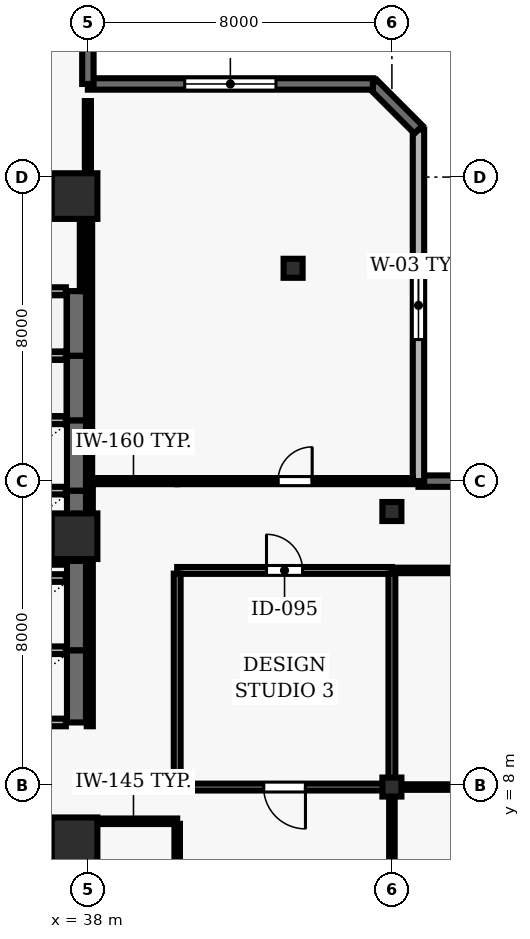
"""IFC4 building model, lengths in metres.
Left out: names, types, materials, properties, quantities, classifications, styles, units other than length and angle.
Written with IfcOpenShell. Run it as: python <this file> out.ifc"""

import sys

from ifc_helpers import new_model, si_unit, direction, frame, frame_2d, origin, origin_2d, place, context, subcontext, project, spatial, rectangle, hollow_rectangle, extrude, element, fill, save


model = new_model("IFC4")
c1 = context("Model", 3, precision=1e-05, world=origin(), true_north=direction((0.0, 1.0)))
c2 = subcontext(c1, "Body", "Model", "MODEL_VIEW")
j1 = project(units=[si_unit("LENGTHUNIT", "METRE"), si_unit("PLANEANGLEUNIT", "RADIAN")], contexts=[c1])
p1 = place(None, origin())
s1 = spatial("IfcSite", under=j1, at=p1, CompositionType="ELEMENT")
p2 = place(p1, origin())
s2 = spatial("IfcBuilding", under=s1, at=p2, CompositionType="ELEMENT")
p3 = place(p2, frame((0.0, 0.0, 138.5)))
s3 = spatial("IfcBuildingStorey", under=s2, at=p3, CompositionType="ELEMENT", Elevation=138.5)
for number, where, z_axis, x_axis in (
    (1, (37.65, 6.55, 0.0), (0.0, 0.0, 1.0), (1.0, 0.0, 0.0)),
    (2, (37.65, 14.55, 0.0), (0.0, 0.0, 1.0), (1.0, 0.0, 0.0)),
    (3, (37.65, 23.5, 0.0), (0.0, 0.0, 1.0), (1.0, 0.0, 0.0)),
):
    element("IfcColumn", number, at=place(p3, frame(where, z_axis=z_axis, x_axis=x_axis)), inside=s3, PredefinedType="COLUMN", context=c2, shape_type="SweptSolid", body=[
        extrude(rectangle(XDim=1.2, YDim=1.2, at=origin_2d()), origin(), (0.0, 0.0, 1.0), 3.9),
    ])
for number, where, z_axis, x_axis in (
    (4, (46.0, 7.95, 0.0), (0.0, 0.0, 1.0), (1.0, 0.0, 0.0)),
    (5, (46.0, 15.2, 0.0), (0.0, 0.0, 1.0), (1.0, 0.0, 0.0)),
    (6, (43.4, 21.6, 0.0), (0.0, 0.0, 1.0), (1.0, 0.0, 0.0)),
):
    element("IfcColumn", number, at=place(p3, frame(where, z_axis=z_axis, x_axis=x_axis)), inside=s3, PredefinedType="COLUMN", context=c2, shape_type="SweptSolid", body=[
        extrude(hollow_rectangle(XDim=0.5, YDim=0.5, WallThickness=0.025, at=origin_2d()), origin(), (0.0, 0.0, 1.0), 3.9),
    ])
p4 = place(p3, frame((68.1, 16.0, 0.0), z_axis=(0.0, 0.0, 1.0), x_axis=(-1.0, 0.0, 0.0)))
e7 = element("IfcWall", 7, at=p4, inside=s3, PredefinedType="SOLIDWALL", context=c2, shape_type="SweptSolid", body=[
    extrude(rectangle(XDim=21.401, YDim=0.3, at=frame_2d((10.701, 0.0))), origin(), (0.0, 0.0, 1.0), 3.69),
])
p5 = place(p4, frame((12.3, 0.0, 0.0)))
e8 = element("IfcOpeningElement", 8, at=p5, cuts=e7, PredefinedType="OPENING", context=c2, shape_type="SweptSolid", body=[
    extrude(rectangle(XDim=1.0, YDim=2.2, at=frame_2d((0.5, 1.1))), frame((0.0, 0.16, 0.0), z_axis=(0.0, -1.0, 0.0), x_axis=(1.0, 0.0, 0.0)), (0.0, 0.0, 1.0), 0.32),
])
p6 = place(p4, frame((2.817, 0.0, 0.9)))
e9 = element("IfcOpeningElement", 9, at=p6, cuts=e7, PredefinedType="OPENING", context=c2, shape_type="SweptSolid", body=[
    extrude(rectangle(XDim=1.5, YDim=1.6, at=frame_2d((0.75, 0.8))), frame((0.0, 0.16, 0.0), z_axis=(0.0, -1.0, 0.0), x_axis=(1.0, 0.0, 0.0)), (0.0, 0.0, 1.0), 0.32),
])
p7 = place(p4, frame((9.95, 0.0, 0.9)))
e10 = element("IfcOpeningElement", 10, at=p7, cuts=e7, PredefinedType="OPENING", context=c2, shape_type="SweptSolid", body=[
    extrude(rectangle(XDim=1.5, YDim=1.6, at=frame_2d((0.75, 0.8))), frame((0.0, 0.16, 0.0), z_axis=(0.0, -1.0, 0.0), x_axis=(1.0, 0.0, 0.0)), (0.0, 0.0, 1.0), 0.32),
])
p8 = place(p4, frame((17.084, 0.0, 0.9)))
e11 = element("IfcOpeningElement", 11, at=p8, cuts=e7, PredefinedType="OPENING", context=c2, shape_type="SweptSolid", body=[
    extrude(rectangle(XDim=1.5, YDim=1.6, at=frame_2d((0.75, 0.8))), frame((0.0, 0.16, 0.0), z_axis=(0.0, -1.0, 0.0), x_axis=(1.0, 0.0, 0.0)), (0.0, 0.0, 1.0), 0.32),
])
p9 = place(p3, frame((46.699, 16.0, 0.0), z_axis=(0.0, 0.0, 1.0), x_axis=(0.0, 1.0, 0.0)))
e12 = element("IfcWall", 12, at=p9, inside=s3, PredefinedType="SOLIDWALL", context=c2, shape_type="SweptSolid", body=[
    extrude(rectangle(XDim=9.25, YDim=0.3, at=frame_2d((4.625, 0.0))), origin(), (0.0, 0.0, 1.0), 3.69),
])
p10 = place(p9, frame((3.725, 0.0, 0.9)))
e13 = element("IfcOpeningElement", 13, at=p10, cuts=e12, PredefinedType="OPENING", context=c2, shape_type="SweptSolid", body=[
    extrude(rectangle(XDim=1.8, YDim=1.6, at=frame_2d((0.9, 0.8))), frame((0.0, 0.16, 0.0), z_axis=(0.0, -1.0, 0.0), x_axis=(1.0, 0.0, 0.0)), (0.0, 0.0, 1.0), 0.32),
])
p11 = place(p3, frame((46.699, 25.25, 0.0), z_axis=(0.0, 0.0, 1.0), x_axis=(-0.707106781187, 0.707106781187, 0.0)))
e14 = element("IfcWall", 14, at=p11, inside=s3, PredefinedType="SOLIDWALL", context=c2, shape_type="SweptSolid", body=[
    extrude(rectangle(XDim=1.697, YDim=0.3, at=frame_2d((0.849, 0.0))), origin(), (0.0, 0.0, 1.0), 3.69),
])
p12 = place(p3, frame((45.499, 26.45, 0.0), z_axis=(0.0, 0.0, 1.0), x_axis=(-1.0, 0.0, 0.0)))
e15 = element("IfcWall", 15, at=p12, inside=s3, PredefinedType="SOLIDWALL", context=c2, shape_type="SweptSolid", body=[
    extrude(rectangle(XDim=7.499, YDim=0.3, at=frame_2d((3.75, 0.0))), origin(), (0.0, 0.0, 1.0), 3.69),
])
p13 = place(p12, frame((2.55, 0.0, 0.9)))
e16 = element("IfcOpeningElement", 16, at=p13, cuts=e15, PredefinedType="OPENING", context=c2, shape_type="SweptSolid", body=[
    extrude(rectangle(XDim=2.4, YDim=1.6, at=frame_2d((1.2, 0.8))), frame((0.0, 0.16, 0.0), z_axis=(0.0, -1.0, 0.0), x_axis=(1.0, 0.0, 0.0)), (0.0, 0.0, 1.0), 0.32),
])
p14 = place(p3, frame((38.0, 26.45, 0.0), z_axis=(0.0, 0.0, 1.0), x_axis=(0.0, 1.0, 0.0)))
e17 = element("IfcWall", 17, at=p14, inside=s3, PredefinedType="SOLIDWALL", context=c2, shape_type="SweptSolid", body=[
    extrude(rectangle(XDim=19.65, YDim=0.3, at=frame_2d((9.825, 0.0))), origin(), (0.0, 0.0, 1.0), 3.69),
])
p15 = place(p14, frame((11.625, 0.0, 0.0)))
e18 = element("IfcOpeningElement", 18, at=p15, cuts=e17, PredefinedType="OPENING", context=c2, shape_type="SweptSolid", body=[
    extrude(rectangle(XDim=1.0, YDim=2.2, at=frame_2d((0.5, 1.1))), frame((0.0, 0.16, 0.0), z_axis=(0.0, -1.0, 0.0), x_axis=(1.0, 0.0, 0.0)), (0.0, 0.0, 1.0), 0.32),
])
p16 = place(p14, frame((15.625, 0.0, 0.9)))
e19 = element("IfcOpeningElement", 19, at=p16, cuts=e17, PredefinedType="OPENING", context=c2, shape_type="SweptSolid", body=[
    extrude(rectangle(XDim=1.5, YDim=1.8, at=frame_2d((0.75, 0.9))), frame((0.0, 0.16, 0.0), z_axis=(0.0, -1.0, 0.0), x_axis=(1.0, 0.0, 0.0)), (0.0, 0.0, 1.0), 0.32),
])
p17 = place(p3, frame((37.7, 4.7, 0.0), z_axis=(0.0, 0.0, 1.0), x_axis=(0.0, 1.0, 0.0)))
e20 = element("IfcWall", 20, at=p17, inside=s3, PredefinedType="SHEAR", context=c2, shape_type="SweptSolid", body=[
    extrude(rectangle(XDim=2.25, YDim=0.5, at=frame_2d((1.125, 0.0))), origin(), (0.0, 0.0, 1.0), 3.69),
])
p18 = place(p3, frame((37.42, 6.95, 0.0), z_axis=(0.0, 0.0, 1.0), x_axis=(-1.0, 0.0, 0.0)))
e21 = element("IfcWall", 21, at=p18, inside=s3, PredefinedType="SOLIDWALL", context=c2, shape_type="SweptSolid", body=[
    extrude(rectangle(XDim=2.14, YDim=0.2, at=frame_2d((1.07, 0.0))), origin(), (0.0, 0.0, 1.0), 3.69),
])
p19 = place(p3, frame((37.7, 9.65, 0.0), z_axis=(0.0, 0.0, 1.0), x_axis=(0.0, 1.0, 0.0)))
e22 = element("IfcWall", 22, at=p19, inside=s3, PredefinedType="SHEAR", context=c2, shape_type="SweptSolid", body=[
    extrude(rectangle(XDim=1.9, YDim=0.5, at=frame_2d((0.95, 0.0))), origin(), (0.0, 0.0, 1.0), 3.69),
])
for number, where, z_axis, x_axis in (
    (23, (35.28, 9.65, 0.0), (0.0, 0.0, 1.0), (1.0, 0.0, 0.0)),
    (24, (37.42, 11.55, 0.0), (0.0, 0.0, 1.0), (-1.0, 0.0, 0.0)),
):
    element("IfcWall", number, at=place(p3, frame(where, z_axis=z_axis, x_axis=x_axis)), inside=s3, PredefinedType="SOLIDWALL", context=c2, shape_type="SweptSolid", body=[
        extrude(rectangle(XDim=2.14, YDim=0.2, at=frame_2d((1.07, 0.0))), origin(), (0.0, 0.0, 1.0), 3.69),
    ])
p20 = place(p3, frame((37.7, 11.55, 0.0), z_axis=(0.0, 0.0, 1.0), x_axis=(0.0, 1.0, 0.0)))
e25 = element("IfcWall", 25, at=p20, inside=s3, PredefinedType="SHEAR", context=c2, shape_type="SweptSolid", body=[
    extrude(rectangle(XDim=2.35, YDim=0.5, at=frame_2d((1.175, 0.0))), origin(), (0.0, 0.0, 1.0), 3.69),
])
p21 = place(p3, frame((37.42, 13.45, 0.0), z_axis=(0.0, 0.0, 1.0), x_axis=(-1.0, 0.0, 0.0)))
e26 = element("IfcWall", 26, at=p21, inside=s3, PredefinedType="SOLIDWALL", context=c2, shape_type="SweptSolid", body=[
    extrude(rectangle(XDim=2.14, YDim=0.2, at=frame_2d((1.07, 0.0))), origin(), (0.0, 0.0, 1.0), 3.69),
])
p22 = place(p3, frame((37.7, 13.9, 0.0), z_axis=(0.0, 0.0, 1.0), x_axis=(0.0, 1.0, 0.0)))
e27 = element("IfcWall", 27, at=p22, inside=s3, PredefinedType="SHEAR", context=c2, shape_type="SweptSolid", body=[
    extrude(rectangle(XDim=1.85, YDim=0.5, at=frame_2d((0.925, 0.0))), origin(), (0.0, 0.0, 1.0), 3.69),
])
for number, where, z_axis, x_axis in (
    (28, (35.28, 13.9, 0.0), (0.0, 0.0, 1.0), (1.0, 0.0, 0.0)),
    (29, (37.42, 15.75, 0.0), (0.0, 0.0, 1.0), (-1.0, 0.0, 0.0)),
):
    element("IfcWall", number, at=place(p3, frame(where, z_axis=z_axis, x_axis=x_axis)), inside=s3, PredefinedType="SOLIDWALL", context=c2, shape_type="SweptSolid", body=[
        extrude(rectangle(XDim=2.14, YDim=0.2, at=frame_2d((1.07, 0.0))), origin(), (0.0, 0.0, 1.0), 3.69),
    ])
p23 = place(p3, frame((37.7, 15.75, 0.0), z_axis=(0.0, 0.0, 1.0), x_axis=(0.0, 1.0, 0.0)))
e30 = element("IfcWall", 30, at=p23, inside=s3, PredefinedType="SHEAR", context=c2, shape_type="SweptSolid", body=[
    extrude(rectangle(XDim=1.85, YDim=0.5, at=frame_2d((0.925, 0.0))), origin(), (0.0, 0.0, 1.0), 3.69),
])
p24 = place(p3, frame((37.42, 17.6, 0.0), z_axis=(0.0, 0.0, 1.0), x_axis=(-1.0, 0.0, 0.0)))
e31 = element("IfcWall", 31, at=p24, inside=s3, PredefinedType="SOLIDWALL", context=c2, shape_type="SweptSolid", body=[
    extrude(rectangle(XDim=2.14, YDim=0.2, at=frame_2d((1.07, 0.0))), origin(), (0.0, 0.0, 1.0), 3.69),
])
p25 = place(p3, frame((37.7, 17.6, 0.0), z_axis=(0.0, 0.0, 1.0), x_axis=(0.0, 1.0, 0.0)))
e32 = element("IfcWall", 32, at=p25, inside=s3, PredefinedType="SHEAR", context=c2, shape_type="SweptSolid", body=[
    extrude(rectangle(XDim=1.7, YDim=0.5, at=frame_2d((0.85, 0.0))), origin(), (0.0, 0.0, 1.0), 3.69),
])
p26 = place(p3, frame((37.42, 19.3, 0.0), z_axis=(0.0, 0.0, 1.0), x_axis=(-1.0, 0.0, 0.0)))
e33 = element("IfcWall", 33, at=p26, inside=s3, PredefinedType="SOLIDWALL", context=c2, shape_type="SweptSolid", body=[
    extrude(rectangle(XDim=2.14, YDim=0.2, at=frame_2d((1.07, 0.0))), origin(), (0.0, 0.0, 1.0), 3.69),
])
p27 = place(p3, frame((37.7, 19.3, 0.0), z_axis=(0.0, 0.0, 1.0), x_axis=(0.0, 1.0, 0.0)))
e34 = element("IfcWall", 34, at=p27, inside=s3, PredefinedType="SHEAR", context=c2, shape_type="SweptSolid", body=[
    extrude(rectangle(XDim=1.7, YDim=0.5, at=frame_2d((0.85, 0.0))), origin(), (0.0, 0.0, 1.0), 3.69),
])
p28 = place(p3, frame((37.42, 21.0, 0.0), z_axis=(0.0, 0.0, 1.0), x_axis=(-1.0, 0.0, 0.0)))
e35 = element("IfcWall", 35, at=p28, inside=s3, PredefinedType="SOLIDWALL", context=c2, shape_type="SweptSolid", body=[
    extrude(rectangle(XDim=2.14, YDim=0.2, at=frame_2d((1.07, 0.0))), origin(), (0.0, 0.0, 1.0), 3.69),
])
p29 = place(p3, frame((37.85, 23.85, 0.0), z_axis=(0.0, 0.0, 1.0), x_axis=(-1.0, 0.0, 0.0)))
e36 = element("IfcWall", 36, at=p29, inside=s3, PredefinedType="PARTITIONING", context=c2, shape_type="SweptSolid", body=[
    extrude(rectangle(XDim=2.0, YDim=0.16, at=frame_2d((1.0, 0.0))), origin(), (0.0, 0.0, 1.0), 3.073),
])
p30 = place(p3, frame((38.05, 7.05, 0.0), z_axis=(0.0, 0.0, 1.0), x_axis=(1.0, 0.0, 0.0)))
e37 = element("IfcWall", 37, at=p30, inside=s3, PredefinedType="PARTITIONING", context=c2, shape_type="SweptSolid", body=[
    extrude(rectangle(XDim=2.3, YDim=0.145, at=frame_2d((1.15, 0.0))), origin(), (0.0, 0.0, 1.0), 3.69),
])
p31 = place(p3, frame((40.35, 13.65, 0.0), z_axis=(0.0, 0.0, 1.0), x_axis=(1.0, 0.0, 0.0)))
e38 = element("IfcWall", 38, at=p31, inside=s3, PredefinedType="PARTITIONING", context=c2, shape_type="SweptSolid", body=[
    extrude(rectangle(XDim=5.65, YDim=0.18, at=frame_2d((2.825, 0.0))), origin(), (0.0, 0.0, 1.0), 3.69),
])
p32 = place(p31, frame((2.35, 0.0, 0.0)))
e39 = element("IfcOpeningElement", 39, at=p32, cuts=e38, PredefinedType="OPENING", context=c2, shape_type="SweptSolid", body=[
    extrude(rectangle(XDim=0.95, YDim=2.1, at=frame_2d((0.475, 1.05))), frame((0.0, 0.1, 0.0), z_axis=(0.0, -1.0, 0.0), x_axis=(1.0, 0.0, 0.0)), (0.0, 0.0, 1.0), 0.2),
])
p33 = place(p3, frame((40.35, 16.0, 0.0), z_axis=(0.0, 0.0, 1.0), x_axis=(-1.0, 0.0, 0.0)))
e40 = element("IfcWall", 40, at=p33, inside=s3, PredefinedType="PARTITIONING", context=c2, shape_type="SweptSolid", body=[
    extrude(rectangle(XDim=2.3, YDim=0.16, at=frame_2d((1.15, 0.0))), origin(), (0.0, 0.0, 1.0), 3.69),
])
p34 = place(p3, frame((40.35, 16.0, 0.0), z_axis=(0.0, 0.0, 1.0), x_axis=(1.0, 0.0, 0.0)))
e41 = element("IfcWall", 41, at=p34, inside=s3, PredefinedType="PARTITIONING", context=c2, shape_type="SweptSolid", body=[
    extrude(rectangle(XDim=6.204, YDim=0.16, at=frame_2d((3.102, 0.0))), origin(), (0.0, 0.0, 1.0), 3.39),
])
p35 = place(p34, frame((2.652, 0.0, 0.0)))
e42 = element("IfcOpeningElement", 42, at=p35, cuts=e41, PredefinedType="OPENING", context=c2, shape_type="SweptSolid", body=[
    extrude(rectangle(XDim=0.9, YDim=2.1, at=frame_2d((0.45, 1.05))), frame((0.0, 0.09, 0.0), z_axis=(0.0, -1.0, 0.0), x_axis=(1.0, 0.0, 0.0)), (0.0, 0.0, 1.0), 0.18),
])
p36 = place(p3, frame((46.0, 7.95, 0.0), z_axis=(0.0, 0.0, 1.0), x_axis=(-1.0, 0.0, 0.0)))
e43 = element("IfcWall", 43, at=p36, inside=s3, PredefinedType="PARTITIONING", context=c2, shape_type="SweptSolid", body=[
    extrude(rectangle(XDim=5.65, YDim=0.18, at=frame_2d((2.825, 0.0))), origin(), (0.0, 0.0, 1.0), 3.073),
])
p37 = place(p36, frame((2.275, 0.0, 0.0)))
e44 = element("IfcOpeningElement", 44, at=p37, cuts=e43, PredefinedType="OPENING", context=c2, shape_type="SweptSolid", body=[
    extrude(rectangle(XDim=1.1, YDim=2.15, at=frame_2d((0.55, 1.075))), frame((0.0, 0.1, 0.0), z_axis=(0.0, -1.0, 0.0), x_axis=(1.0, 0.0, 0.0)), (0.0, 0.0, 1.0), 0.2),
])
p38 = place(p3, frame((46.0, 13.65, 0.0), z_axis=(0.0, 0.0, 1.0), x_axis=(1.0, 0.0, 0.0)))
e45 = element("IfcWall", 45, at=p38, inside=s3, PredefinedType="PARTITIONING", context=c2, shape_type="SweptSolid", body=[
    extrude(rectangle(XDim=7.05, YDim=0.145, at=frame_2d((3.525, 0.0))), origin(), (0.0, 0.0, 1.0), 3.69),
])
p39 = place(p38, frame((2.975, 0.0, 0.0)))
e46 = element("IfcOpeningElement", 46, at=p39, cuts=e45, PredefinedType="OPENING", context=c2, shape_type="SweptSolid", body=[
    extrude(rectangle(XDim=1.1, YDim=2.15, at=frame_2d((0.55, 1.075))), frame((0.0, 0.083, 0.0), z_axis=(0.0, -1.0, 0.0), x_axis=(1.0, 0.0, 0.0)), (0.0, 0.0, 1.0), 0.165),
])
p40 = place(p3, frame((53.05, 7.95, 0.0), z_axis=(0.0, 0.0, 1.0), x_axis=(-1.0, 0.0, 0.0)))
e47 = element("IfcWall", 47, at=p40, inside=s3, PredefinedType="PARTITIONING", context=c2, shape_type="SweptSolid", body=[
    extrude(rectangle(XDim=7.05, YDim=0.145, at=frame_2d((3.525, 0.0))), origin(), (0.0, 0.0, 1.0), 3.073),
])
p41 = place(p3, frame((37.85, 21.0, 0.0), z_axis=(0.0, 0.0, 1.0), x_axis=(0.0, 1.0, 0.0)))
e48 = element("IfcWall", 48, at=p41, inside=s3, PredefinedType="PARTITIONING", context=c2, shape_type="SweptSolid", body=[
    extrude(rectangle(XDim=2.775, YDim=0.125, at=frame_2d((1.387, 0.0))), origin(), (0.0, 0.0, 1.0), 3.073),
])
p42 = place(p3, frame((38.0, 23.85, 0.0), z_axis=(0.0, 0.0, 1.0), x_axis=(0.0, 1.0, 0.0)))
e49 = element("IfcWall", 49, at=p42, inside=s3, PredefinedType="PARTITIONING", context=c2, shape_type="SweptSolid", body=[
    extrude(rectangle(XDim=2.15, YDim=0.16, at=frame_2d((1.075, 0.0))), origin(), (0.0, 0.0, 1.0), 3.073),
])
p43 = place(p3, frame((38.05, 6.982, 0.0), z_axis=(0.0, 0.0, 1.0), x_axis=(0.0, -1.0, 0.0)))
e50 = element("IfcWall", 50, at=p43, inside=s3, PredefinedType="PARTITIONING", context=c2, shape_type="SweptSolid", body=[
    extrude(rectangle(XDim=6.837, YDim=0.145, at=frame_2d((3.418, 0.0))), origin(), (0.0, 0.0, 1.0), 3.073),
])
p44 = place(p3, frame((38.05, 15.925, 0.0), z_axis=(0.0, 0.0, 1.0), x_axis=(0.0, -1.0, 0.0)))
e51 = element("IfcWall", 51, at=p44, inside=s3, PredefinedType="PARTITIONING", context=c2, shape_type="SweptSolid", body=[
    extrude(rectangle(XDim=6.375, YDim=0.16, at=frame_2d((3.188, 0.0))), origin(), (0.0, 0.0, 1.0), 3.073),
])
p45 = place(p3, frame((38.05, 23.85, 0.0), z_axis=(0.0, 0.0, 1.0), x_axis=(0.0, -1.0, 0.0)))
e52 = element("IfcWall", 52, at=p45, inside=s3, PredefinedType="PARTITIONING", context=c2, shape_type="SweptSolid", body=[
    extrude(rectangle(XDim=7.775, YDim=0.125, at=frame_2d((3.888, 0.0))), origin(), (0.0, 0.0, 1.0), 3.073),
])
p46 = place(p3, frame((40.35, 0.145, 0.0), z_axis=(0.0, 0.0, 1.0), x_axis=(0.0, 1.0, 0.0)))
e53 = element("IfcWall", 53, at=p46, inside=s3, PredefinedType="PARTITIONING", context=c2, shape_type="SweptSolid", body=[
    extrude(rectangle(XDim=6.837, YDim=0.145, at=frame_2d((3.418, 0.0))), origin(), (0.0, 0.0, 1.0), 3.69),
])
p47 = place(p46, frame((2.869, 0.0, 0.0)))
e54 = element("IfcOpeningElement", 54, at=p47, cuts=e53, PredefinedType="OPENING", context=c2, shape_type="SweptSolid", body=[
    extrude(rectangle(XDim=1.1, YDim=2.15, at=frame_2d((0.55, 1.075))), frame((0.0, 0.083, 0.0), z_axis=(0.0, -1.0, 0.0), x_axis=(1.0, 0.0, 0.0)), (0.0, 0.0, 1.0), 0.165),
])
p48 = place(p3, frame((40.35, 8.035, 0.0), z_axis=(0.0, 0.0, 1.0), x_axis=(0.0, 1.0, 0.0)))
e55 = element("IfcWall", 55, at=p48, inside=s3, PredefinedType="PARTITIONING", context=c2, shape_type="SweptSolid", body=[
    extrude(rectangle(XDim=5.53, YDim=0.18, at=frame_2d((2.765, 0.0))), origin(), (0.0, 0.0, 1.0), 3.69),
])
p49 = place(p3, frame((46.0, 0.145, 0.0), z_axis=(0.0, 0.0, 1.0), x_axis=(0.0, 1.0, 0.0)))
e56 = element("IfcWall", 56, at=p49, inside=s3, PredefinedType="PARTITIONING", context=c2, shape_type="SweptSolid", body=[
    extrude(rectangle(XDim=7.72, YDim=0.145, at=frame_2d((3.86, 0.0))), origin(), (0.0, 0.0, 1.0), 3.073),
])
p50 = place(p49, frame((3.31, 0.0, 0.0)))
e57 = element("IfcOpeningElement", 57, at=p50, cuts=e56, PredefinedType="OPENING", context=c2, shape_type="SweptSolid", body=[
    extrude(rectangle(XDim=1.1, YDim=2.15, at=frame_2d((0.55, 1.075))), frame((0.0, 0.083, 0.0), z_axis=(0.0, -1.0, 0.0), x_axis=(1.0, 0.0, 0.0)), (0.0, 0.0, 1.0), 0.165),
])
p51 = place(p3, frame((46.0, 8.035, 0.0), z_axis=(0.0, 0.0, 1.0), x_axis=(0.0, 1.0, 0.0)))
e58 = element("IfcWall", 58, at=p51, inside=s3, PredefinedType="PARTITIONING", context=c2, shape_type="SweptSolid", body=[
    extrude(rectangle(XDim=5.53, YDim=0.18, at=frame_2d((2.765, 0.0))), origin(), (0.0, 0.0, 1.0), 3.073),
])
p52 = place(p10, origin())
e59 = element("IfcWindow", 59, at=p52, inside=s3, PartitioningType="SINGLE_PANEL", PredefinedType="WINDOW", context=c2, shape_type="SweptSolid", body=[
    extrude(rectangle(XDim=1.8, YDim=1.6, at=frame_2d((0.9, 0.8))), frame((0.0, 0.03, 0.0), z_axis=(0.0, -1.0, 0.0), x_axis=(1.0, 0.0, 0.0)), (0.0, 0.0, 1.0), 0.06),
])
fill(e13, e59)
p53 = place(p13, origin())
e60 = element("IfcWindow", 60, at=p53, inside=s3, PartitioningType="SINGLE_PANEL", PredefinedType="WINDOW", context=c2, shape_type="SweptSolid", body=[
    extrude(rectangle(XDim=2.4, YDim=1.6, at=frame_2d((1.2, 0.8))), frame((0.0, 0.03, 0.0), z_axis=(0.0, -1.0, 0.0), x_axis=(1.0, 0.0, 0.0)), (0.0, 0.0, 1.0), 0.06),
])
fill(e16, e60)
p54 = place(p32, origin())
e61 = element("IfcDoor", 61, at=p54, inside=s3, OperationType="SINGLE_SWING_LEFT", PredefinedType="DOOR", context=c2, shape_type="SweptSolid", body=[
    extrude(rectangle(XDim=0.95, YDim=2.1, at=frame_2d((0.475, 1.05))), frame((0.0, 0.025, 0.0), z_axis=(0.0, -1.0, 0.0), x_axis=(1.0, 0.0, 0.0)), (0.0, 0.0, 1.0), 0.05),
])
fill(e39, e61)
p55 = place(p35, origin())
e62 = element("IfcDoor", 62, at=p55, inside=s3, OperationType="SINGLE_SWING_RIGHT", PredefinedType="DOOR", context=c2, shape_type="SweptSolid", body=[
    extrude(rectangle(XDim=0.9, YDim=2.1, at=frame_2d((0.45, 1.05))), frame((0.0, 0.025, 0.0), z_axis=(0.0, -1.0, 0.0), x_axis=(1.0, 0.0, 0.0)), (0.0, 0.0, 1.0), 0.05),
])
fill(e42, e62)
p56 = place(p37, origin())
e63 = element("IfcDoor", 63, at=p56, inside=s3, OperationType="SINGLE_SWING_LEFT", PredefinedType="DOOR", context=c2, shape_type="SweptSolid", body=[
    extrude(rectangle(XDim=1.1, YDim=2.15, at=frame_2d((0.55, 1.075))), frame((0.0, 0.025, 0.0), z_axis=(0.0, -1.0, 0.0), x_axis=(1.0, 0.0, 0.0)), (0.0, 0.0, 1.0), 0.05),
])
fill(e44, e63)
save(model, sys.argv[1])
